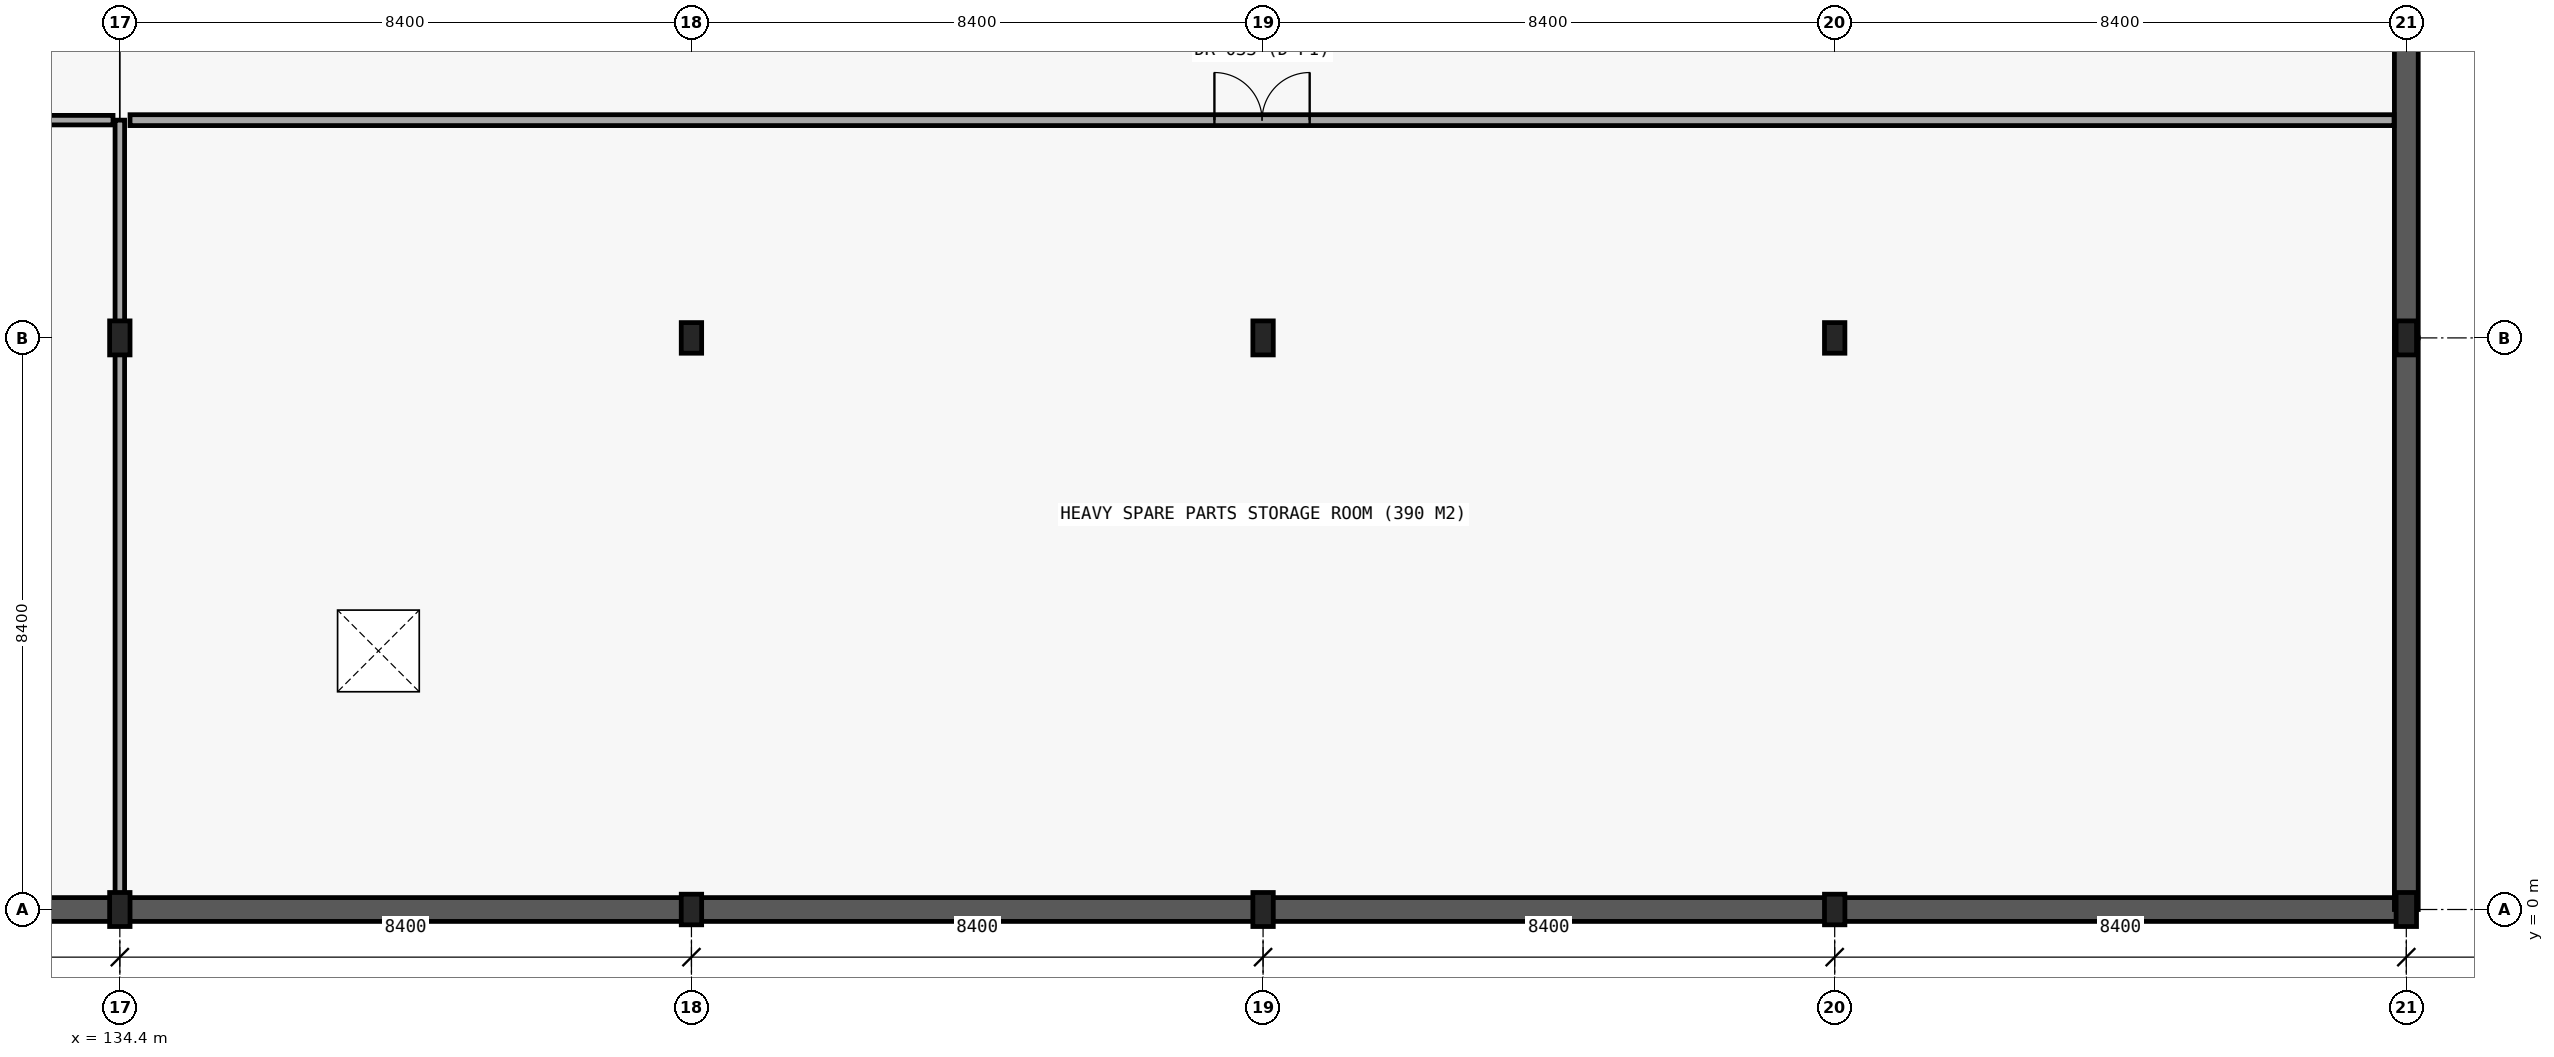
"""IFC4 building model, lengths in metres.
Left out: names, types, materials, properties, quantities, classifications, styles, units other than length and angle.
Written with IfcOpenShell. Run it as: python <this file> out.ifc"""

import sys

from ifc_helpers import new_model, si_unit, direction, frame, frame_2d, origin, origin_2d, place, context, subcontext, project, spatial, rectangle, i_section, extrude, element, fill, save


model = new_model("IFC4")
c1 = context("Model", 3, precision=1e-05, world=origin(), true_north=direction((0.0, 1.0)))
c2 = subcontext(c1, "Body", "Model", "MODEL_VIEW")
j1 = project(units=[si_unit("LENGTHUNIT", "METRE"), si_unit("PLANEANGLEUNIT", "RADIAN")], contexts=[c1])
p1 = place(None, origin())
s1 = spatial("IfcSite", under=j1, at=p1, CompositionType="ELEMENT")
p2 = place(p1, origin())
s2 = spatial("IfcBuilding", under=s1, at=p2, CompositionType="ELEMENT")
p3 = place(p2, frame((0.0, 0.0, -4.5)))
s3 = spatial("IfcBuildingStorey", under=s2, at=p3, CompositionType="ELEMENT", Elevation=-4.5)
p4 = place(p3, frame((126.0, 0.0, -0.35), z_axis=(0.0, 0.0, 1.0), x_axis=(1.0, 0.0, 0.0)))
e1 = element("IfcWall", 1, at=p4, inside=s3, PredefinedType="SOLIDWALL", context=c2, shape_type="SweptSolid", body=[
    extrude(rectangle(XDim=8.4, YDim=0.35, at=frame_2d((4.2, 0.0))), origin(), (0.0, 0.0, 1.0), 4.6),
])
p5 = place(p3, frame((134.4, 0.0, -0.35), z_axis=(0.0, 0.0, 1.0), x_axis=(1.0, 0.0, 0.0)))
e2 = element("IfcWall", 2, at=p5, inside=s3, PredefinedType="SOLIDWALL", context=c2, shape_type="SweptSolid", body=[
    extrude(rectangle(XDim=8.4, YDim=0.35, at=frame_2d((4.2, 0.0))), origin(), (0.0, 0.0, 1.0), 4.6),
])
p6 = place(p3, frame((142.8, 0.0, -0.35), z_axis=(0.0, 0.0, 1.0), x_axis=(1.0, 0.0, 0.0)))
e3 = element("IfcWall", 3, at=p6, inside=s3, PredefinedType="SOLIDWALL", context=c2, shape_type="SweptSolid", body=[
    extrude(rectangle(XDim=8.4, YDim=0.35, at=frame_2d((4.2, 0.0))), origin(), (0.0, 0.0, 1.0), 4.6),
])
p7 = place(p3, frame((151.2, 0.0, -0.35), z_axis=(0.0, 0.0, 1.0), x_axis=(1.0, 0.0, 0.0)))
e4 = element("IfcWall", 4, at=p7, inside=s3, PredefinedType="SOLIDWALL", context=c2, shape_type="SweptSolid", body=[
    extrude(rectangle(XDim=8.4, YDim=0.35, at=frame_2d((4.2, 0.0))), origin(), (0.0, 0.0, 1.0), 4.6),
])
for number, where, z_axis, x_axis in (
    (5, (159.6, 0.0, -0.35), (0.0, 0.0, 1.0), (1.0, 0.0, 0.0)),
    (6, (168.0, 0.0, -0.35), (0.0, 0.0, 1.0), (0.0, 1.0, 0.0)),
):
    element("IfcWall", number, at=place(p3, frame(where, z_axis=z_axis, x_axis=x_axis)), inside=s3, PredefinedType="SOLIDWALL", context=c2, shape_type="SweptSolid", body=[
        extrude(rectangle(XDim=8.4, YDim=0.35, at=frame_2d((4.2, 0.0))), origin(), (0.0, 0.0, 1.0), 4.6),
    ])
p8 = place(p3, frame((168.0, 8.4, -0.35), z_axis=(0.0, 0.0, 1.0), x_axis=(0.0, 1.0, 0.0)))
e7 = element("IfcWall", 7, at=p8, inside=s3, PredefinedType="SOLIDWALL", context=c2, shape_type="SweptSolid", body=[
    extrude(rectangle(XDim=8.4, YDim=0.35, at=frame_2d((4.2, 0.0))), origin(), (0.0, 0.0, 1.0), 4.6),
])
for number, where, z_axis, x_axis in (
    (8, (134.4, 0.0, -0.35), (0.0, 0.0, 1.0), (1.0, 0.0, 0.0)),
    (9, (134.4, 8.4, -0.35), (0.0, 0.0, 1.0), (1.0, 0.0, 0.0)),
):
    element("IfcColumn", number, at=place(p3, frame(where, z_axis=z_axis, x_axis=x_axis)), inside=s3, PredefinedType="COLUMN", context=c2, shape_type="SweptSolid", body=[
        extrude(i_section(OverallWidth=0.3, OverallDepth=0.5, WebThickness=0.014, FlangeThickness=0.028, FilletRadius=0.027, at=origin_2d()), origin(), (0.0, 0.0, 1.0), 4.85),
    ])
for number, where, z_axis, x_axis in (
    (10, (142.8, 0.0, -0.35), (0.0, 0.0, 1.0), (1.0, 0.0, 0.0)),
    (11, (142.8, 8.4, -0.35), (0.0, 0.0, 1.0), (1.0, 0.0, 0.0)),
):
    element("IfcColumn", number, at=place(p3, frame(where, z_axis=z_axis, x_axis=x_axis)), inside=s3, PredefinedType="COLUMN", context=c2, shape_type="SweptSolid", body=[
        extrude(i_section(OverallWidth=0.3, OverallDepth=0.45, WebThickness=0.014, FlangeThickness=0.026, FilletRadius=0.027, at=origin_2d()), origin(), (0.0, 0.0, 1.0), 4.85),
    ])
for number, where, z_axis, x_axis in (
    (12, (151.2, 0.0, -0.35), (0.0, 0.0, 1.0), (1.0, 0.0, 0.0)),
    (13, (151.2, 8.4, -0.35), (0.0, 0.0, 1.0), (1.0, 0.0, 0.0)),
):
    element("IfcColumn", number, at=place(p3, frame(where, z_axis=z_axis, x_axis=x_axis)), inside=s3, PredefinedType="COLUMN", context=c2, shape_type="SweptSolid", body=[
        extrude(i_section(OverallWidth=0.3, OverallDepth=0.5, WebThickness=0.014, FlangeThickness=0.028, FilletRadius=0.027, at=origin_2d()), origin(), (0.0, 0.0, 1.0), 4.85),
    ])
for number, where, z_axis, x_axis in (
    (14, (159.6, 0.0, -0.35), (0.0, 0.0, 1.0), (1.0, 0.0, 0.0)),
    (15, (159.6, 8.4, -0.35), (0.0, 0.0, 1.0), (1.0, 0.0, 0.0)),
):
    element("IfcColumn", number, at=place(p3, frame(where, z_axis=z_axis, x_axis=x_axis)), inside=s3, PredefinedType="COLUMN", context=c2, shape_type="SweptSolid", body=[
        extrude(i_section(OverallWidth=0.3, OverallDepth=0.45, WebThickness=0.014, FlangeThickness=0.026, FilletRadius=0.027, at=origin_2d()), origin(), (0.0, 0.0, 1.0), 4.85),
    ])
for number, where, z_axis, x_axis in (
    (16, (168.0, 0.0, -0.35), (0.0, 0.0, 1.0), (1.0, 0.0, 0.0)),
    (17, (168.0, 8.4, -0.35), (0.0, 0.0, 1.0), (1.0, 0.0, 0.0)),
):
    element("IfcColumn", number, at=place(p3, frame(where, z_axis=z_axis, x_axis=x_axis)), inside=s3, PredefinedType="COLUMN", context=c2, shape_type="SweptSolid", body=[
        extrude(i_section(OverallWidth=0.3, OverallDepth=0.5, WebThickness=0.014, FlangeThickness=0.028, FilletRadius=0.027, at=origin_2d()), origin(), (0.0, 0.0, 1.0), 4.85),
    ])
p9 = place(p3, frame((126.15, 11.6, 0.0), z_axis=(0.0, 0.0, 1.0), x_axis=(1.0, 0.0, 0.0)))
e18 = element("IfcWall", 18, at=p9, inside=s3, PredefinedType="PARTITIONING", context=c2, shape_type="SweptSolid", body=[
    extrude(rectangle(XDim=8.15, YDim=0.14, at=frame_2d((4.075, 0.0))), origin(), (0.0, 0.0, 1.0), 3.8),
])
p10 = place(p3, frame((134.55, 11.6, 0.0), z_axis=(0.0, 0.0, 1.0), x_axis=(1.0, 0.0, 0.0)))
e19 = element("IfcWall", 19, at=p10, inside=s3, PredefinedType="PARTITIONING", context=c2, shape_type="SweptSolid", body=[
    extrude(rectangle(XDim=33.27, YDim=0.16, at=frame_2d((16.635, 0.0))), origin(), (0.0, 0.0, 1.0), 3.8),
])
p11 = place(p10, frame((15.935, 0.0, 0.0)))
e20 = element("IfcOpeningElement", 20, at=p11, cuts=e19, PredefinedType="OPENING", context=c2, shape_type="SweptSolid", body=[
    extrude(rectangle(XDim=1.4, YDim=2.25, at=frame_2d((0.7, 1.125))), frame((0.0, 0.09, 0.0), z_axis=(0.0, -1.0, 0.0), x_axis=(1.0, 0.0, 0.0)), (0.0, 0.0, 1.0), 0.18),
])
p12 = place(p3, frame((134.4, 0.18, 0.0), z_axis=(0.0, 0.0, 1.0), x_axis=(0.0, 1.0, 0.0)))
e21 = element("IfcWall", 21, at=p12, inside=s3, PredefinedType="PARTITIONING", context=c2, shape_type="SweptSolid", body=[
    extrude(rectangle(XDim=11.42, YDim=0.14, at=frame_2d((5.71, 0.0))), origin(), (0.0, 0.0, 1.0), 3.57),
])
p13 = place(p11, origin())
e22 = element("IfcDoor", 22, at=p13, inside=s3, OperationType="DOUBLE_DOOR_SINGLE_SWING", PredefinedType="DOOR", context=c2, shape_type="SweptSolid", body=[
    extrude(rectangle(XDim=1.4, YDim=2.25, at=frame_2d((0.7, 1.125))), frame((0.0, 0.025, 0.0), z_axis=(0.0, -1.0, 0.0), x_axis=(1.0, 0.0, 0.0)), (0.0, 0.0, 1.0), 0.05),
])
fill(e20, e22)
save(model, sys.argv[1])
